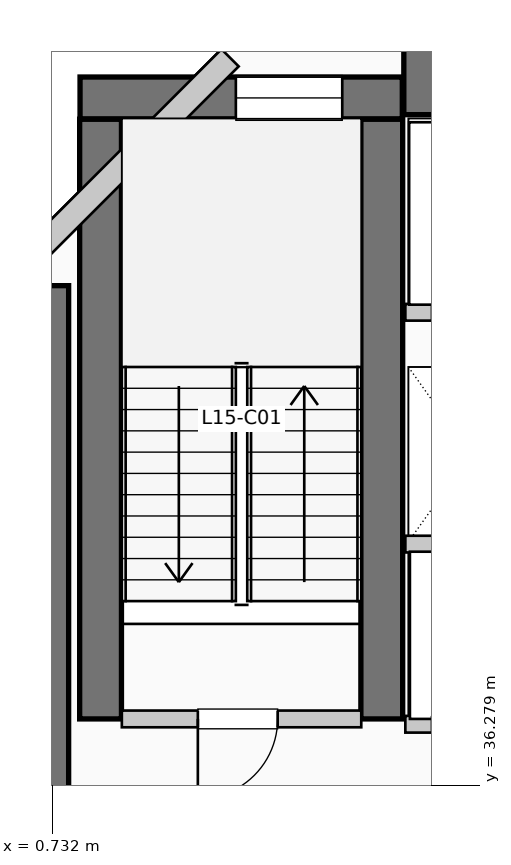
"""IFC4 building model, lengths in metres.
Left out: names, types, materials, properties, quantities, classifications, styles, units other than length and angle.
Written with IfcOpenShell. Run it as: python <this file> out.ifc"""

import sys

from ifc_helpers import new_model, si_unit, direction, frame, frame_2d, origin, place, context, subcontext, project, spatial, rectangle, extrude, element, fill, save


model = new_model("IFC4")
c1 = context("Model", 3, precision=1e-05, world=origin(), true_north=direction((0.0, 1.0)))
c2 = subcontext(c1, "Body", "Model", "MODEL_VIEW")
j1 = project(units=[si_unit("LENGTHUNIT", "METRE"), si_unit("PLANEANGLEUNIT", "RADIAN")], contexts=[c1])
p1 = place(None, origin())
s1 = spatial("IfcSite", under=j1, at=p1, CompositionType="ELEMENT")
p2 = place(p1, origin())
s2 = spatial("IfcBuilding", under=s1, at=p2, CompositionType="ELEMENT")
p3 = place(p2, frame((0.0, 0.0, 66.0)))
s3 = spatial("IfcBuildingStorey", under=s2, at=p3, CompositionType="ELEMENT", Elevation=66.0)
p4 = place(p3, frame((5.36, 45.55, 0.0), z_axis=(0.0, 0.0, 1.0), x_axis=(1.0, 0.0, 0.0)))
e1 = element("IfcWall", 1, at=p4, inside=s3, PredefinedType="SHEAR", context=c2, shape_type="SweptSolid", body=[
    extrude(rectangle(XDim=13.98, YDim=0.9, at=frame_2d((6.99, 0.0))), origin(), (0.0, 0.0, 1.0), 3.96),
])
p5 = place(p3, frame((0.5, 34.95, 0.0), z_axis=(0.0, 0.0, 1.0), x_axis=(0.0, 1.0, 0.0)))
e2 = element("IfcWall", 2, at=p5, inside=s3, PredefinedType="SHEAR", context=c2, shape_type="SweptSolid", body=[
    extrude(rectangle(XDim=7.9, YDim=0.9, at=frame_2d((3.95, 0.0))), origin(), (0.0, 0.0, 1.0), 3.96),
])
for number, where, z_axis, x_axis in (
    (3, (1.37, 37.15, 0.0), (0.0, 0.0, 1.0), (0.0, 1.0, 0.0)),
    (4, (5.07, 37.15, 0.0), (0.0, 0.0, 1.0), (0.0, 1.0, 0.0)),
):
    element("IfcWall", number, at=place(p3, frame(where, z_axis=z_axis, x_axis=x_axis)), inside=s3, PredefinedType="SHEAR", context=c2, shape_type="SweptSolid", body=[
        extrude(rectangle(XDim=7.89, YDim=0.55, at=frame_2d((3.945, 0.0))), origin(), (0.0, 0.0, 1.0), 3.96),
    ])
p6 = place(p3, frame((1.1, 45.32, 0.0), z_axis=(0.0, 0.0, 1.0), x_axis=(1.0, 0.0, 0.0)))
e5 = element("IfcWall", 5, at=p6, inside=s3, PredefinedType="SHEAR", context=c2, shape_type="SweptSolid", body=[
    extrude(rectangle(XDim=4.24, YDim=0.55, at=frame_2d((2.12, 0.0))), origin(), (0.0, 0.0, 1.0), 3.96),
])
p7 = place(p6, frame((2.05, 0.0, 1.05)))
e6 = element("IfcOpeningElement", 6, at=p7, cuts=e5, PredefinedType="OPENING", context=c2, shape_type="SweptSolid", body=[
    extrude(rectangle(XDim=1.4, YDim=1.8, at=frame_2d((0.7, 0.9))), frame((0.0, 0.285, 0.0), z_axis=(0.0, -1.0, 0.0), x_axis=(1.0, 0.0, 0.0)), (0.0, 0.0, 1.0), 0.57),
])
p8 = place(p3, frame((3.074, 45.848, 0.0), z_axis=(0.0, 0.0, 1.0), x_axis=(-0.707106781187, -0.707106781187, 0.0)))
e7 = element("IfcWall", 7, at=p8, inside=s3, PredefinedType="SOLIDWALL", context=c2, shape_type="SweptSolid", body=[
    extrude(rectangle(XDim=4.133, YDim=0.32, at=frame_2d((2.066, 0.0))), origin(), (0.0, 0.0, 1.0), 3.71),
])
p9 = place(p3, frame((1.65, 37.15, 0.0), z_axis=(0.0, 0.0, 1.0), x_axis=(1.0, 0.0, 0.0)))
e8 = element("IfcWall", 8, at=p9, inside=s3, PredefinedType="PARTITIONING", context=c2, shape_type="SweptSolid", body=[
    extrude(rectangle(XDim=3.15, YDim=0.22, at=frame_2d((1.575, 0.0))), origin(), (0.0, 0.0, 1.0), 3.71),
])
p10 = place(p9, frame((2.05, 0.0, 0.0), z_axis=(0.0, 0.0, 1.0), x_axis=(-1.0, 0.0, 0.0)))
e9 = element("IfcOpeningElement", 9, at=p10, cuts=e8, PredefinedType="OPENING", context=c2, shape_type="SweptSolid", body=[
    extrude(rectangle(XDim=1.05, YDim=2.15, at=frame_2d((0.525, 1.075))), frame((0.0, 0.12, 0.0), z_axis=(0.0, -1.0, 0.0), x_axis=(1.0, 0.0, 0.0)), (0.0, 0.0, 1.0), 0.24),
])
p11 = place(p3, frame((5.38, 37.08, 0.0), z_axis=(0.0, 0.0, 1.0), x_axis=(1.0, 0.0, 0.0)))
e10 = element("IfcWall", 10, at=p11, inside=s3, PredefinedType="PARTITIONING", context=c2, shape_type="SweptSolid", body=[
    extrude(rectangle(XDim=3.46, YDim=0.22, at=frame_2d((1.73, 0.0))), origin(), (0.0, 0.0, 1.0), 3.71),
])
p12 = place(p11, frame((1.55, 0.0, 0.0), z_axis=(0.0, 0.0, 1.0), x_axis=(-1.0, 0.0, 0.0)))
e11 = element("IfcOpeningElement", 11, at=p12, cuts=e10, PredefinedType="OPENING", context=c2, shape_type="SweptSolid", body=[
    extrude(rectangle(XDim=1.2, YDim=2.2, at=frame_2d((0.6, 1.1))), frame((0.0, 0.12, 0.0), z_axis=(0.0, -1.0, 0.0), x_axis=(1.0, 0.0, 0.0)), (0.0, 0.0, 1.0), 0.24),
])
p13 = place(p11, frame((3.22, 0.0, 0.0), z_axis=(0.0, 0.0, 1.0), x_axis=(-1.0, 0.0, 0.0)))
e12 = element("IfcOpeningElement", 12, at=p13, cuts=e10, PredefinedType="OPENING", context=c2, shape_type="SweptSolid", body=[
    extrude(rectangle(XDim=1.2, YDim=2.2, at=frame_2d((0.6, 1.1))), frame((0.0, 0.12, 0.0), z_axis=(0.0, -1.0, 0.0), x_axis=(1.0, 0.0, 0.0)), (0.0, 0.0, 1.0), 0.24),
])
p14 = place(p3, frame((5.38, 39.45, 0.0), z_axis=(0.0, 0.0, 1.0), x_axis=(1.0, 0.0, 0.0)))
e13 = element("IfcWall", 13, at=p14, inside=s3, PredefinedType="PARTITIONING", context=c2, shape_type="SweptSolid", body=[
    extrude(rectangle(XDim=3.46, YDim=0.22, at=frame_2d((1.73, 0.0))), origin(), (0.0, 0.0, 1.0), 3.71),
])
p15 = place(p3, frame((5.38, 42.5, 0.0), z_axis=(0.0, 0.0, 1.0), x_axis=(1.0, 0.0, 0.0)))
e14 = element("IfcWall", 14, at=p15, inside=s3, PredefinedType="PARTITIONING", context=c2, shape_type="SweptSolid", body=[
    extrude(rectangle(XDim=3.77, YDim=0.22, at=frame_2d((1.885, 0.0))), origin(), (0.0, 0.0, 1.0), 3.71),
])
p16 = place(p15, frame((1.75, 0.0, 0.0), z_axis=(0.0, 0.0, 1.0), x_axis=(-1.0, 0.0, 0.0)))
e15 = element("IfcOpeningElement", 15, at=p16, cuts=e14, PredefinedType="OPENING", context=c2, shape_type="SweptSolid", body=[
    extrude(rectangle(XDim=1.4, YDim=2.2, at=frame_2d((0.7, 1.1))), frame((0.0, 0.12, 0.0), z_axis=(0.0, -1.0, 0.0), x_axis=(1.0, 0.0, 0.0)), (0.0, 0.0, 1.0), 0.24),
])
p17 = place(p15, frame((3.53, 0.0, 0.0), z_axis=(0.0, 0.0, 1.0), x_axis=(-1.0, 0.0, 0.0)))
e16 = element("IfcOpeningElement", 16, at=p17, cuts=e14, PredefinedType="OPENING", context=c2, shape_type="SweptSolid", body=[
    extrude(rectangle(XDim=1.4, YDim=2.2, at=frame_2d((0.7, 1.1))), frame((0.0, 0.12, 0.0), z_axis=(0.0, -1.0, 0.0), x_axis=(1.0, 0.0, 0.0)), (0.0, 0.0, 1.0), 0.24),
])
p18 = place(p7, origin())
e17 = element("IfcWindow", 17, at=p18, inside=s3, PartitioningType="SINGLE_PANEL", PredefinedType="WINDOW", context=c2, shape_type="SweptSolid", body=[
    extrude(rectangle(XDim=1.4, YDim=1.8, at=frame_2d((0.7, 0.9))), frame((0.0, 0.03, 0.0), z_axis=(0.0, -1.0, 0.0), x_axis=(1.0, 0.0, 0.0)), (0.0, 0.0, 1.0), 0.06),
])
fill(e6, e17)
p19 = place(p10, origin())
e18 = element("IfcDoor", 18, at=p19, inside=s3, OperationType="SINGLE_SWING_LEFT", PredefinedType="DOOR", context=c2, shape_type="SweptSolid", body=[
    extrude(rectangle(XDim=1.05, YDim=2.15, at=frame_2d((0.525, 1.075))), frame((0.0, 0.025, 0.0), z_axis=(0.0, -1.0, 0.0), x_axis=(1.0, 0.0, 0.0)), (0.0, 0.0, 1.0), 0.05),
])
fill(e9, e18)
save(model, sys.argv[1])
